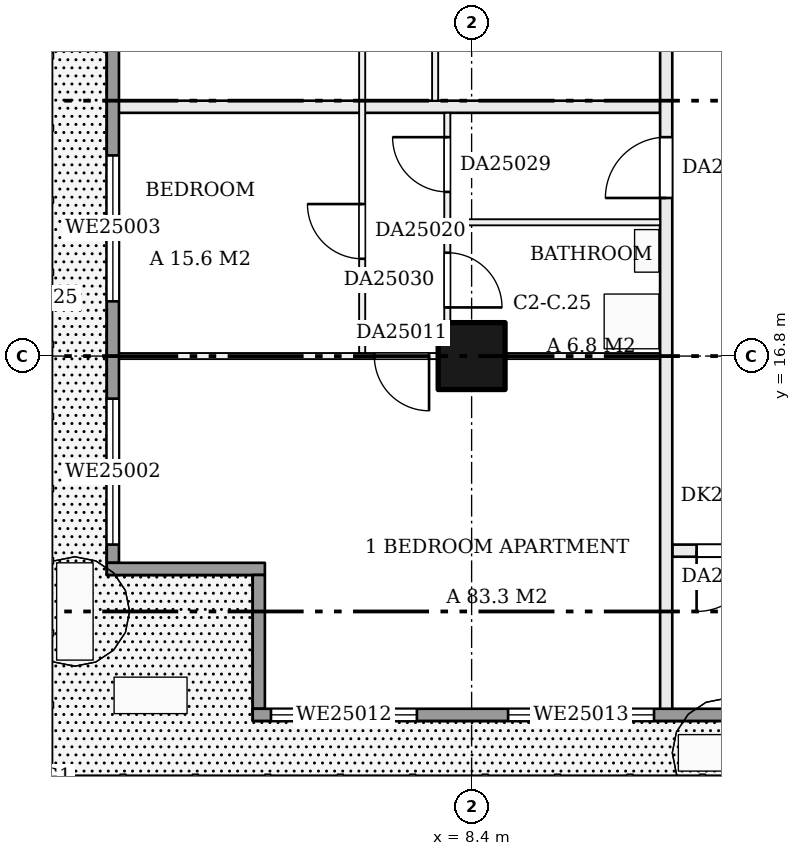
"""IFC4 building model, lengths in metres.
Left out: names, types, materials, properties, quantities, classifications, styles, units other than length and angle.
Written with IfcOpenShell. Run it as: python <this file> out.ifc"""

import sys

from ifc_helpers import new_model, si_unit, direction, frame, frame_2d, origin, origin_2d, place, context, subcontext, project, spatial, rectangle, extrude, element, fill, save


model = new_model("IFC4")
c1 = context("Model", 3, precision=1e-05, world=origin(), true_north=direction((0.0, 1.0)))
c2 = subcontext(c1, "Body", "Model", "MODEL_VIEW")
j1 = project(units=[si_unit("LENGTHUNIT", "METRE"), si_unit("PLANEANGLEUNIT", "RADIAN")], contexts=[c1])
p1 = place(None, origin())
s1 = spatial("IfcSite", under=j1, at=p1, CompositionType="ELEMENT")
p2 = place(p1, origin())
s2 = spatial("IfcBuilding", under=s1, at=p2, CompositionType="ELEMENT")
p3 = place(p2, frame((0.0, 0.0, 102.2)))
s3 = spatial("IfcBuildingStorey", under=s2, at=p3, CompositionType="ELEMENT", Elevation=102.2)
p4 = place(p3, frame((8.4, 16.8, 0.0), z_axis=(0.0, 0.0, 1.0), x_axis=(1.0, 0.0, 0.0)))
e1 = element("IfcColumn", 1, at=p4, inside=s3, PredefinedType="COLUMN", context=c2, shape_type="SweptSolid", body=[
    extrude(rectangle(XDim=1.1, YDim=1.1, at=origin_2d()), origin(), (0.0, 0.0, 1.0), 3.22),
])
p5 = place(p3, frame((11.7, 13.6, 0.0), z_axis=(0.0, 0.0, 1.0), x_axis=(1.0, 0.0, 0.0)))
e2 = element("IfcWall", 2, at=p5, inside=s3, PredefinedType="PARTITIONING", context=c2, shape_type="SweptSolid", body=[
    extrude(rectangle(XDim=1.8, YDim=0.2, at=frame_2d((0.9, 0.0))), origin(), (0.0, 0.0, 1.0), 3.22),
])
p6 = place(p5, frame((0.4, 0.0, 0.0)))
e3 = element("IfcOpeningElement", 3, at=p6, cuts=e2, PredefinedType="OPENING", context=c2, shape_type="SweptSolid", body=[
    extrude(rectangle(XDim=1.0, YDim=2.1, at=frame_2d((0.5, 1.05))), frame((0.0, 0.11, 0.0), z_axis=(0.0, -1.0, 0.0), x_axis=(1.0, 0.0, 0.0)), (0.0, 0.0, 1.0), 0.22),
])
p7 = place(p3, frame((2.5, 16.8, 0.0), z_axis=(0.0, 0.0, 1.0), x_axis=(1.0, 0.0, 0.0)))
e4 = element("IfcWall", 4, at=p7, inside=s3, PredefinedType="PARTITIONING", context=c2, shape_type="SweptSolid", body=[
    extrude(rectangle(XDim=9.0, YDim=0.1, at=frame_2d((4.5, 0.0))), origin(), (0.0, 0.0, 1.0), 3.22),
])
p8 = place(p7, frame((4.3, 0.0, 0.0)))
e5 = element("IfcOpeningElement", 5, at=p8, cuts=e4, PredefinedType="OPENING", context=c2, shape_type="SweptSolid", body=[
    extrude(rectangle(XDim=0.9, YDim=2.1, at=frame_2d((0.45, 1.05))), frame((0.0, 0.06, 0.0), z_axis=(0.0, -1.0, 0.0), x_axis=(1.0, 0.0, 0.0)), (0.0, 0.0, 1.0), 0.12),
])
p9 = place(p3, frame((8.05, 19.0, 0.0), z_axis=(0.0, 0.0, 1.0), x_axis=(1.0, 0.0, 0.0)))
e6 = element("IfcWall", 6, at=p9, inside=s3, PredefinedType="PARTITIONING", context=c2, shape_type="SweptSolid", body=[
    extrude(rectangle(XDim=3.45, YDim=0.1, at=frame_2d((1.725, 0.0))), origin(), (0.0, 0.0, 1.0), 3.22),
])
p10 = place(p3, frame((2.5, 20.9, 0.0), z_axis=(0.0, 0.0, 1.0), x_axis=(1.0, 0.0, 0.0)))
e7 = element("IfcWall", 7, at=p10, inside=s3, PredefinedType="PARTITIONING", context=c2, shape_type="SweptSolid", body=[
    extrude(rectangle(XDim=9.0, YDim=0.2, at=frame_2d((4.5, 0.0))), origin(), (0.0, 0.0, 1.0), 3.22),
])
p11 = place(p3, frame((6.6, 16.85, 0.0), z_axis=(0.0, 0.0, 1.0), x_axis=(0.0, 1.0, 0.0)))
e8 = element("IfcWall", 8, at=p11, inside=s3, PredefinedType="PARTITIONING", context=c2, shape_type="SweptSolid", body=[
    extrude(rectangle(XDim=25.05, YDim=0.1, at=frame_2d((12.525, 0.0))), origin(), (0.0, 0.0, 1.0), 3.22),
])
p12 = place(p11, frame((1.55, 0.0, 0.0)))
e9 = element("IfcOpeningElement", 9, at=p12, cuts=e8, PredefinedType="OPENING", context=c2, shape_type="SweptSolid", body=[
    extrude(rectangle(XDim=0.9, YDim=2.1, at=frame_2d((0.45, 1.05))), frame((0.0, 0.06, 0.0), z_axis=(0.0, -1.0, 0.0), x_axis=(1.0, 0.0, 0.0)), (0.0, 0.0, 1.0), 0.12),
])
p13 = place(p11, frame((9.95, 0.0, 0.0)))
e10 = element("IfcOpeningElement", 10, at=p13, cuts=e8, PredefinedType="OPENING", context=c2, shape_type="SweptSolid", body=[
    extrude(rectangle(XDim=0.9, YDim=2.1, at=frame_2d((0.45, 1.05))), frame((0.0, 0.06, 0.0), z_axis=(0.0, -1.0, 0.0), x_axis=(1.0, 0.0, 0.0)), (0.0, 0.0, 1.0), 0.12),
])
p14 = place(p11, frame((18.35, 0.0, 0.0)))
e11 = element("IfcOpeningElement", 11, at=p14, cuts=e8, PredefinedType="OPENING", context=c2, shape_type="SweptSolid", body=[
    extrude(rectangle(XDim=0.9, YDim=2.1, at=frame_2d((0.45, 1.05))), frame((0.0, 0.06, 0.0), z_axis=(0.0, -1.0, 0.0), x_axis=(1.0, 0.0, 0.0)), (0.0, 0.0, 1.0), 0.12),
])
p15 = place(p11, frame((22.55, 0.0, 0.0)))
e12 = element("IfcOpeningElement", 12, at=p15, cuts=e8, PredefinedType="OPENING", context=c2, shape_type="SweptSolid", body=[
    extrude(rectangle(XDim=0.9, YDim=2.1, at=frame_2d((0.45, 1.05))), frame((0.0, 0.06, 0.0), z_axis=(0.0, -1.0, 0.0), x_axis=(1.0, 0.0, 0.0)), (0.0, 0.0, 1.0), 0.12),
])
p16 = place(p3, frame((7.8, 21.0, 0.0), z_axis=(0.0, 0.0, 1.0), x_axis=(0.0, 1.0, 0.0)))
e13 = element("IfcWall", 13, at=p16, inside=s3, PredefinedType="PARTITIONING", context=c2, shape_type="SweptSolid", body=[
    extrude(rectangle(XDim=20.9, YDim=0.1, at=frame_2d((10.45, 0.0))), origin(), (0.0, 0.0, 1.0), 3.22),
])
p17 = place(p16, frame((1.5, 0.0, 0.0)))
e14 = element("IfcOpeningElement", 14, at=p17, cuts=e13, PredefinedType="OPENING", context=c2, shape_type="SweptSolid", body=[
    extrude(rectangle(XDim=0.9, YDim=2.1, at=frame_2d((0.45, 1.05))), frame((0.0, 0.06, 0.0), z_axis=(0.0, -1.0, 0.0), x_axis=(1.0, 0.0, 0.0)), (0.0, 0.0, 1.0), 0.12),
])
p18 = place(p16, frame((5.48, 0.0, 0.0)))
e15 = element("IfcOpeningElement", 15, at=p18, cuts=e13, PredefinedType="OPENING", context=c2, shape_type="SweptSolid", body=[
    extrude(rectangle(XDim=0.9, YDim=2.1, at=frame_2d((0.45, 1.05))), frame((0.0, 0.06, 0.0), z_axis=(0.0, -1.0, 0.0), x_axis=(1.0, 0.0, 0.0)), (0.0, 0.0, 1.0), 0.12),
])
p19 = place(p16, frame((9.26, 0.0, 0.0)))
e16 = element("IfcOpeningElement", 16, at=p19, cuts=e13, PredefinedType="OPENING", context=c2, shape_type="SweptSolid", body=[
    extrude(rectangle(XDim=0.9, YDim=2.1, at=frame_2d((0.45, 1.05))), frame((0.0, 0.06, 0.0), z_axis=(0.0, -1.0, 0.0), x_axis=(1.0, 0.0, 0.0)), (0.0, 0.0, 1.0), 0.12),
])
p20 = place(p16, frame((13.64, 0.0, 0.0)))
e17 = element("IfcOpeningElement", 17, at=p20, cuts=e13, PredefinedType="OPENING", context=c2, shape_type="SweptSolid", body=[
    extrude(rectangle(XDim=0.9, YDim=2.1, at=frame_2d((0.45, 1.05))), frame((0.0, 0.06, 0.0), z_axis=(0.0, -1.0, 0.0), x_axis=(1.0, 0.0, 0.0)), (0.0, 0.0, 1.0), 0.12),
])
p21 = place(p16, frame((18.32, 0.0, 0.0)))
e18 = element("IfcOpeningElement", 18, at=p21, cuts=e13, PredefinedType="OPENING", context=c2, shape_type="SweptSolid", body=[
    extrude(rectangle(XDim=0.9, YDim=2.1, at=frame_2d((0.45, 1.05))), frame((0.0, 0.06, 0.0), z_axis=(0.0, -1.0, 0.0), x_axis=(1.0, 0.0, 0.0)), (0.0, 0.0, 1.0), 0.12),
])
p22 = place(p3, frame((8.0, 16.85, 0.0), z_axis=(0.0, 0.0, 1.0), x_axis=(0.0, 1.0, 0.0)))
e19 = element("IfcWall", 19, at=p22, inside=s3, PredefinedType="PARTITIONING", context=c2, shape_type="SweptSolid", body=[
    extrude(rectangle(XDim=3.95, YDim=0.1, at=frame_2d((1.975, 0.0))), origin(), (0.0, 0.0, 1.0), 3.22),
])
p23 = place(p22, frame((2.65, 0.0, 0.0)))
e20 = element("IfcOpeningElement", 20, at=p23, cuts=e19, PredefinedType="OPENING", context=c2, shape_type="SweptSolid", body=[
    extrude(rectangle(XDim=0.9, YDim=2.1, at=frame_2d((0.45, 1.05))), frame((0.0, 0.06, 0.0), z_axis=(0.0, -1.0, 0.0), x_axis=(1.0, 0.0, 0.0)), (0.0, 0.0, 1.0), 0.12),
])
p24 = place(p22, frame((0.75, 0.0, 0.0)))
e21 = element("IfcOpeningElement", 21, at=p24, cuts=e19, PredefinedType="OPENING", context=c2, shape_type="SweptSolid", body=[
    extrude(rectangle(XDim=0.9, YDim=2.1, at=frame_2d((0.45, 1.05))), frame((0.0, 0.06, 0.0), z_axis=(0.0, -1.0, 0.0), x_axis=(1.0, 0.0, 0.0)), (0.0, 0.0, 1.0), 0.12),
])
p25 = place(p3, frame((11.6, 10.9, 0.0), z_axis=(0.0, 0.0, 1.0), x_axis=(0.0, 1.0, 0.0)))
e22 = element("IfcWall", 22, at=p25, inside=s3, PredefinedType="PARTITIONING", context=c2, shape_type="SweptSolid", body=[
    extrude(rectangle(XDim=31.1, YDim=0.2, at=frame_2d((15.55, 0.0))), origin(), (0.0, 0.0, 1.0), 3.22),
])
p26 = place(p25, frame((8.5, 0.0, 0.0)))
e23 = element("IfcOpeningElement", 23, at=p26, cuts=e22, PredefinedType="OPENING", context=c2, shape_type="SweptSolid", body=[
    extrude(rectangle(XDim=1.0, YDim=2.1, at=frame_2d((0.5, 1.05))), frame((0.0, 0.11, 0.0), z_axis=(0.0, -1.0, 0.0), x_axis=(1.0, 0.0, 0.0)), (0.0, 0.0, 1.0), 0.22),
])
p27 = place(p25, frame((11.6, 0.0, 0.0)))
e24 = element("IfcOpeningElement", 24, at=p27, cuts=e22, PredefinedType="OPENING", context=c2, shape_type="SweptSolid", body=[
    extrude(rectangle(XDim=1.0, YDim=2.1, at=frame_2d((0.5, 1.05))), frame((0.0, 0.11, 0.0), z_axis=(0.0, -1.0, 0.0), x_axis=(1.0, 0.0, 0.0)), (0.0, 0.0, 1.0), 0.22),
])
p28 = place(p3, frame((2.5, 53.8, 0.0), z_axis=(0.0, 0.0, 1.0), x_axis=(0.0, -1.0, 0.0)))
e25 = element("IfcWall", 25, at=p28, inside=s3, PredefinedType="SOLIDWALL", context=c2, shape_type="SweptSolid", body=[
    extrude(rectangle(XDim=40.4, YDim=0.2, at=frame_2d((20.2, 0.0))), origin(), (0.0, 0.0, 1.0), 3.22),
])
p29 = place(p28, frame((37.7, 0.0, 0.9)))
e26 = element("IfcOpeningElement", 26, at=p29, cuts=e25, PredefinedType="OPENING", context=c2, shape_type="SweptSolid", body=[
    extrude(rectangle(XDim=2.4, YDim=1.5, at=frame_2d((1.2, 0.75))), frame((0.0, 0.11, 0.0), z_axis=(0.0, -1.0, 0.0), x_axis=(1.0, 0.0, 0.0)), (0.0, 0.0, 1.0), 0.22),
])
p30 = place(p28, frame((33.7, 0.0, 0.9)))
e27 = element("IfcOpeningElement", 27, at=p30, cuts=e25, PredefinedType="OPENING", context=c2, shape_type="SweptSolid", body=[
    extrude(rectangle(XDim=2.4, YDim=1.5, at=frame_2d((1.2, 0.75))), frame((0.0, 0.11, 0.0), z_axis=(0.0, -1.0, 0.0), x_axis=(1.0, 0.0, 0.0)), (0.0, 0.0, 1.0), 0.22),
])
p31 = place(p28, frame((29.5, 0.0, 0.0)))
e28 = element("IfcOpeningElement", 28, at=p31, cuts=e25, PredefinedType="OPENING", context=c2, shape_type="SweptSolid", body=[
    extrude(rectangle(XDim=2.4, YDim=2.2, at=frame_2d((1.2, 1.1))), frame((0.0, 0.11, 0.0), z_axis=(0.0, -1.0, 0.0), x_axis=(1.0, 0.0, 0.0)), (0.0, 0.0, 1.0), 0.22),
])
p32 = place(p28, frame((25.3, 0.0, 0.0)))
e29 = element("IfcOpeningElement", 29, at=p32, cuts=e25, PredefinedType="OPENING", context=c2, shape_type="SweptSolid", body=[
    extrude(rectangle(XDim=2.4, YDim=2.2, at=frame_2d((1.2, 1.1))), frame((0.0, 0.11, 0.0), z_axis=(0.0, -1.0, 0.0), x_axis=(1.0, 0.0, 0.0)), (0.0, 0.0, 1.0), 0.22),
])
p33 = place(p28, frame((21.1, 0.0, 0.0)))
e30 = element("IfcOpeningElement", 30, at=p33, cuts=e25, PredefinedType="OPENING", context=c2, shape_type="SweptSolid", body=[
    extrude(rectangle(XDim=2.4, YDim=2.2, at=frame_2d((1.2, 1.1))), frame((0.0, 0.11, 0.0), z_axis=(0.0, -1.0, 0.0), x_axis=(1.0, 0.0, 0.0)), (0.0, 0.0, 1.0), 0.22),
])
p34 = place(p28, frame((16.9, 0.0, 0.9)))
e31 = element("IfcOpeningElement", 31, at=p34, cuts=e25, PredefinedType="OPENING", context=c2, shape_type="SweptSolid", body=[
    extrude(rectangle(XDim=2.4, YDim=1.5, at=frame_2d((1.2, 0.75))), frame((0.0, 0.11, 0.0), z_axis=(0.0, -1.0, 0.0), x_axis=(1.0, 0.0, 0.0)), (0.0, 0.0, 1.0), 0.22),
])
p35 = place(p28, frame((12.7, 0.0, 0.9)))
e32 = element("IfcOpeningElement", 32, at=p35, cuts=e25, PredefinedType="OPENING", context=c2, shape_type="SweptSolid", body=[
    extrude(rectangle(XDim=2.4, YDim=1.5, at=frame_2d((1.2, 0.75))), frame((0.0, 0.11, 0.0), z_axis=(0.0, -1.0, 0.0), x_axis=(1.0, 0.0, 0.0)), (0.0, 0.0, 1.0), 0.22),
])
p36 = place(p28, frame((8.5, 0.0, 0.0)))
e33 = element("IfcOpeningElement", 33, at=p36, cuts=e25, PredefinedType="OPENING", context=c2, shape_type="SweptSolid", body=[
    extrude(rectangle(XDim=2.4, YDim=2.2, at=frame_2d((1.2, 1.1))), frame((0.0, 0.11, 0.0), z_axis=(0.0, -1.0, 0.0), x_axis=(1.0, 0.0, 0.0)), (0.0, 0.0, 1.0), 0.22),
])
p37 = place(p28, frame((4.3, 0.0, 0.9)))
e34 = element("IfcOpeningElement", 34, at=p37, cuts=e25, PredefinedType="OPENING", context=c2, shape_type="SweptSolid", body=[
    extrude(rectangle(XDim=2.4, YDim=1.5, at=frame_2d((1.2, 0.75))), frame((0.0, 0.11, 0.0), z_axis=(0.0, -1.0, 0.0), x_axis=(1.0, 0.0, 0.0)), (0.0, 0.0, 1.0), 0.22),
])
p38 = place(p28, frame((0.3, 0.0, 0.9)))
e35 = element("IfcOpeningElement", 35, at=p38, cuts=e25, PredefinedType="OPENING", context=c2, shape_type="SweptSolid", body=[
    extrude(rectangle(XDim=2.4, YDim=1.5, at=frame_2d((1.2, 0.75))), frame((0.0, 0.11, 0.0), z_axis=(0.0, -1.0, 0.0), x_axis=(1.0, 0.0, 0.0)), (0.0, 0.0, 1.0), 0.22),
])
p39 = place(p3, frame((2.4, 13.3, 0.0), z_axis=(0.0, 0.0, 1.0), x_axis=(1.0, 0.0, 0.0)))
e36 = element("IfcWall", 36, at=p39, inside=s3, PredefinedType="SOLIDWALL", context=c2, shape_type="SweptSolid", body=[
    extrude(rectangle(XDim=2.6, YDim=0.2, at=frame_2d((1.3, 0.0))), origin(), (0.0, 0.0, 1.0), 3.22),
])
p40 = place(p3, frame((4.9, 13.2, 0.0), z_axis=(0.0, 0.0, 1.0), x_axis=(0.0, -1.0, 0.0)))
e37 = element("IfcWall", 37, at=p40, inside=s3, PredefinedType="SOLIDWALL", context=c2, shape_type="SweptSolid", body=[
    extrude(rectangle(XDim=2.2, YDim=0.2, at=frame_2d((1.1, 0.0))), origin(), (0.0, 0.0, 1.0), 3.22),
])
p41 = place(p3, frame((4.8, 10.9, 0.0), z_axis=(0.0, 0.0, 1.0), x_axis=(1.0, 0.0, 0.0)))
e38 = element("IfcWall", 38, at=p41, inside=s3, PredefinedType="SOLIDWALL", context=c2, shape_type="SweptSolid", body=[
    extrude(rectangle(XDim=37.2, YDim=0.2, at=frame_2d((18.6, 0.0))), origin(), (0.0, 0.0, 1.0), 3.22),
])
p42 = place(p41, frame((0.3, 0.0, 0.9)))
e39 = element("IfcOpeningElement", 39, at=p42, cuts=e38, PredefinedType="OPENING", context=c2, shape_type="SweptSolid", body=[
    extrude(rectangle(XDim=2.4, YDim=1.5, at=frame_2d((1.2, 0.75))), frame((0.0, 0.11, 0.0), z_axis=(0.0, -1.0, 0.0), x_axis=(1.0, 0.0, 0.0)), (0.0, 0.0, 1.0), 0.22),
])
p43 = place(p41, frame((4.2, 0.0, 0.9)))
e40 = element("IfcOpeningElement", 40, at=p43, cuts=e38, PredefinedType="OPENING", context=c2, shape_type="SweptSolid", body=[
    extrude(rectangle(XDim=2.4, YDim=1.5, at=frame_2d((1.2, 0.75))), frame((0.0, 0.11, 0.0), z_axis=(0.0, -1.0, 0.0), x_axis=(1.0, 0.0, 0.0)), (0.0, 0.0, 1.0), 0.22),
])
p44 = place(p41, frame((12.9, 0.0, 0.9)))
e41 = element("IfcOpeningElement", 41, at=p44, cuts=e38, PredefinedType="OPENING", context=c2, shape_type="SweptSolid", body=[
    extrude(rectangle(XDim=2.4, YDim=1.5, at=frame_2d((1.2, 0.75))), frame((0.0, 0.11, 0.0), z_axis=(0.0, -1.0, 0.0), x_axis=(1.0, 0.0, 0.0)), (0.0, 0.0, 1.0), 0.22),
])
p45 = place(p41, frame((17.1, 0.0, 0.9)))
e42 = element("IfcOpeningElement", 42, at=p45, cuts=e38, PredefinedType="OPENING", context=c2, shape_type="SweptSolid", body=[
    extrude(rectangle(XDim=2.4, YDim=1.5, at=frame_2d((1.2, 0.75))), frame((0.0, 0.11, 0.0), z_axis=(0.0, -1.0, 0.0), x_axis=(1.0, 0.0, 0.0)), (0.0, 0.0, 1.0), 0.22),
])
p46 = place(p41, frame((21.3, 0.0, 0.0)))
e43 = element("IfcOpeningElement", 43, at=p46, cuts=e38, PredefinedType="OPENING", context=c2, shape_type="SweptSolid", body=[
    extrude(rectangle(XDim=2.4, YDim=2.2, at=frame_2d((1.2, 1.1))), frame((0.0, 0.11, 0.0), z_axis=(0.0, -1.0, 0.0), x_axis=(1.0, 0.0, 0.0)), (0.0, 0.0, 1.0), 0.22),
])
p47 = place(p41, frame((25.5, 0.0, 0.9)))
e44 = element("IfcOpeningElement", 44, at=p47, cuts=e38, PredefinedType="OPENING", context=c2, shape_type="SweptSolid", body=[
    extrude(rectangle(XDim=2.4, YDim=1.5, at=frame_2d((1.2, 0.75))), frame((0.0, 0.11, 0.0), z_axis=(0.0, -1.0, 0.0), x_axis=(1.0, 0.0, 0.0)), (0.0, 0.0, 1.0), 0.22),
])
p48 = place(p41, frame((29.7, 0.0, 0.9)))
e45 = element("IfcOpeningElement", 45, at=p48, cuts=e38, PredefinedType="OPENING", context=c2, shape_type="SweptSolid", body=[
    extrude(rectangle(XDim=2.4, YDim=1.5, at=frame_2d((1.2, 0.75))), frame((0.0, 0.11, 0.0), z_axis=(0.0, -1.0, 0.0), x_axis=(1.0, 0.0, 0.0)), (0.0, 0.0, 1.0), 0.22),
])
p49 = place(p41, frame((33.9, 0.0, 0.9)))
e46 = element("IfcOpeningElement", 46, at=p49, cuts=e38, PredefinedType="OPENING", context=c2, shape_type="SweptSolid", body=[
    extrude(rectangle(XDim=1.3, YDim=1.5, at=frame_2d((0.65, 0.75))), frame((0.0, 0.11, 0.0), z_axis=(0.0, -1.0, 0.0), x_axis=(1.0, 0.0, 0.0)), (0.0, 0.0, 1.0), 0.22),
])
p50 = place(p6, frame((1.0, 0.0, 0.0), z_axis=(0.0, 0.0, 1.0), x_axis=(-1.0, 0.0, 0.0)))
e47 = element("IfcDoor", 47, at=p50, inside=s3, OperationType="SINGLE_SWING_RIGHT", PredefinedType="DOOR", context=c2, shape_type="SweptSolid", body=[
    extrude(rectangle(XDim=1.0, YDim=2.1, at=frame_2d((0.5, 1.05))), frame((0.0, 0.025, 0.0), z_axis=(0.0, -1.0, 0.0), x_axis=(1.0, 0.0, 0.0)), (0.0, 0.0, 1.0), 0.05),
])
fill(e3, e47)
p51 = place(p8, frame((0.9, 0.0, 0.0), z_axis=(0.0, 0.0, 1.0), x_axis=(-1.0, 0.0, 0.0)))
e48 = element("IfcDoor", 48, at=p51, inside=s3, OperationType="SINGLE_SWING_LEFT", PredefinedType="DOOR", context=c2, shape_type="SweptSolid", body=[
    extrude(rectangle(XDim=0.9, YDim=2.1, at=frame_2d((0.45, 1.05))), frame((0.0, 0.025, 0.0), z_axis=(0.0, -1.0, 0.0), x_axis=(1.0, 0.0, 0.0)), (0.0, 0.0, 1.0), 0.05),
])
fill(e5, e48)
p52 = place(p12, origin())
e49 = element("IfcDoor", 49, at=p52, inside=s3, OperationType="SINGLE_SWING_RIGHT", PredefinedType="DOOR", context=c2, shape_type="SweptSolid", body=[
    extrude(rectangle(XDim=0.9, YDim=2.1, at=frame_2d((0.45, 1.05))), frame((0.0, 0.025, 0.0), z_axis=(0.0, -1.0, 0.0), x_axis=(1.0, 0.0, 0.0)), (0.0, 0.0, 1.0), 0.05),
])
fill(e9, e49)
p53 = place(p23, origin())
e50 = element("IfcDoor", 50, at=p53, inside=s3, OperationType="SINGLE_SWING_RIGHT", PredefinedType="DOOR", context=c2, shape_type="SweptSolid", body=[
    extrude(rectangle(XDim=0.9, YDim=2.1, at=frame_2d((0.45, 1.05))), frame((0.0, 0.025, 0.0), z_axis=(0.0, -1.0, 0.0), x_axis=(1.0, 0.0, 0.0)), (0.0, 0.0, 1.0), 0.05),
])
fill(e20, e50)
p54 = place(p24, frame((0.9, 0.0, 0.0), z_axis=(0.0, 0.0, 1.0), x_axis=(-1.0, 0.0, 0.0)))
e51 = element("IfcDoor", 51, at=p54, inside=s3, OperationType="SINGLE_SWING_RIGHT", PredefinedType="DOOR", context=c2, shape_type="SweptSolid", body=[
    extrude(rectangle(XDim=0.9, YDim=2.1, at=frame_2d((0.45, 1.05))), frame((0.0, 0.025, 0.0), z_axis=(0.0, -1.0, 0.0), x_axis=(1.0, 0.0, 0.0)), (0.0, 0.0, 1.0), 0.05),
])
fill(e21, e51)
p55 = place(p26, origin())
e52 = element("IfcDoor", 52, at=p55, inside=s3, OperationType="SINGLE_SWING_LEFT", PredefinedType="DOOR", context=c2, shape_type="SweptSolid", body=[
    extrude(rectangle(XDim=1.0, YDim=2.1, at=frame_2d((0.5, 1.05))), frame((0.0, 0.025, 0.0), z_axis=(0.0, -1.0, 0.0), x_axis=(1.0, 0.0, 0.0)), (0.0, 0.0, 1.0), 0.05),
])
fill(e23, e52)
p56 = place(p29, origin())
e53 = element("IfcWindow", 53, at=p56, inside=s3, PartitioningType="SINGLE_PANEL", PredefinedType="WINDOW", context=c2, shape_type="SweptSolid", body=[
    extrude(rectangle(XDim=2.4, YDim=1.5, at=frame_2d((1.2, 0.75))), frame((0.0, 0.03, 0.0), z_axis=(0.0, -1.0, 0.0), x_axis=(1.0, 0.0, 0.0)), (0.0, 0.0, 1.0), 0.06),
])
fill(e26, e53)
p57 = place(p30, origin())
e54 = element("IfcWindow", 54, at=p57, inside=s3, PartitioningType="SINGLE_PANEL", PredefinedType="WINDOW", context=c2, shape_type="SweptSolid", body=[
    extrude(rectangle(XDim=2.4, YDim=1.5, at=frame_2d((1.2, 0.75))), frame((0.0, 0.03, 0.0), z_axis=(0.0, -1.0, 0.0), x_axis=(1.0, 0.0, 0.0)), (0.0, 0.0, 1.0), 0.06),
])
fill(e27, e54)
p58 = place(p42, origin())
e55 = element("IfcWindow", 55, at=p58, inside=s3, PartitioningType="SINGLE_PANEL", PredefinedType="WINDOW", context=c2, shape_type="SweptSolid", body=[
    extrude(rectangle(XDim=2.4, YDim=1.5, at=frame_2d((1.2, 0.75))), frame((0.0, 0.03, 0.0), z_axis=(0.0, -1.0, 0.0), x_axis=(1.0, 0.0, 0.0)), (0.0, 0.0, 1.0), 0.06),
])
fill(e39, e55)
p59 = place(p43, origin())
e56 = element("IfcWindow", 56, at=p59, inside=s3, PartitioningType="SINGLE_PANEL", PredefinedType="WINDOW", context=c2, shape_type="SweptSolid", body=[
    extrude(rectangle(XDim=2.4, YDim=1.5, at=frame_2d((1.2, 0.75))), frame((0.0, 0.03, 0.0), z_axis=(0.0, -1.0, 0.0), x_axis=(1.0, 0.0, 0.0)), (0.0, 0.0, 1.0), 0.06),
])
fill(e40, e56)
save(model, sys.argv[1])
